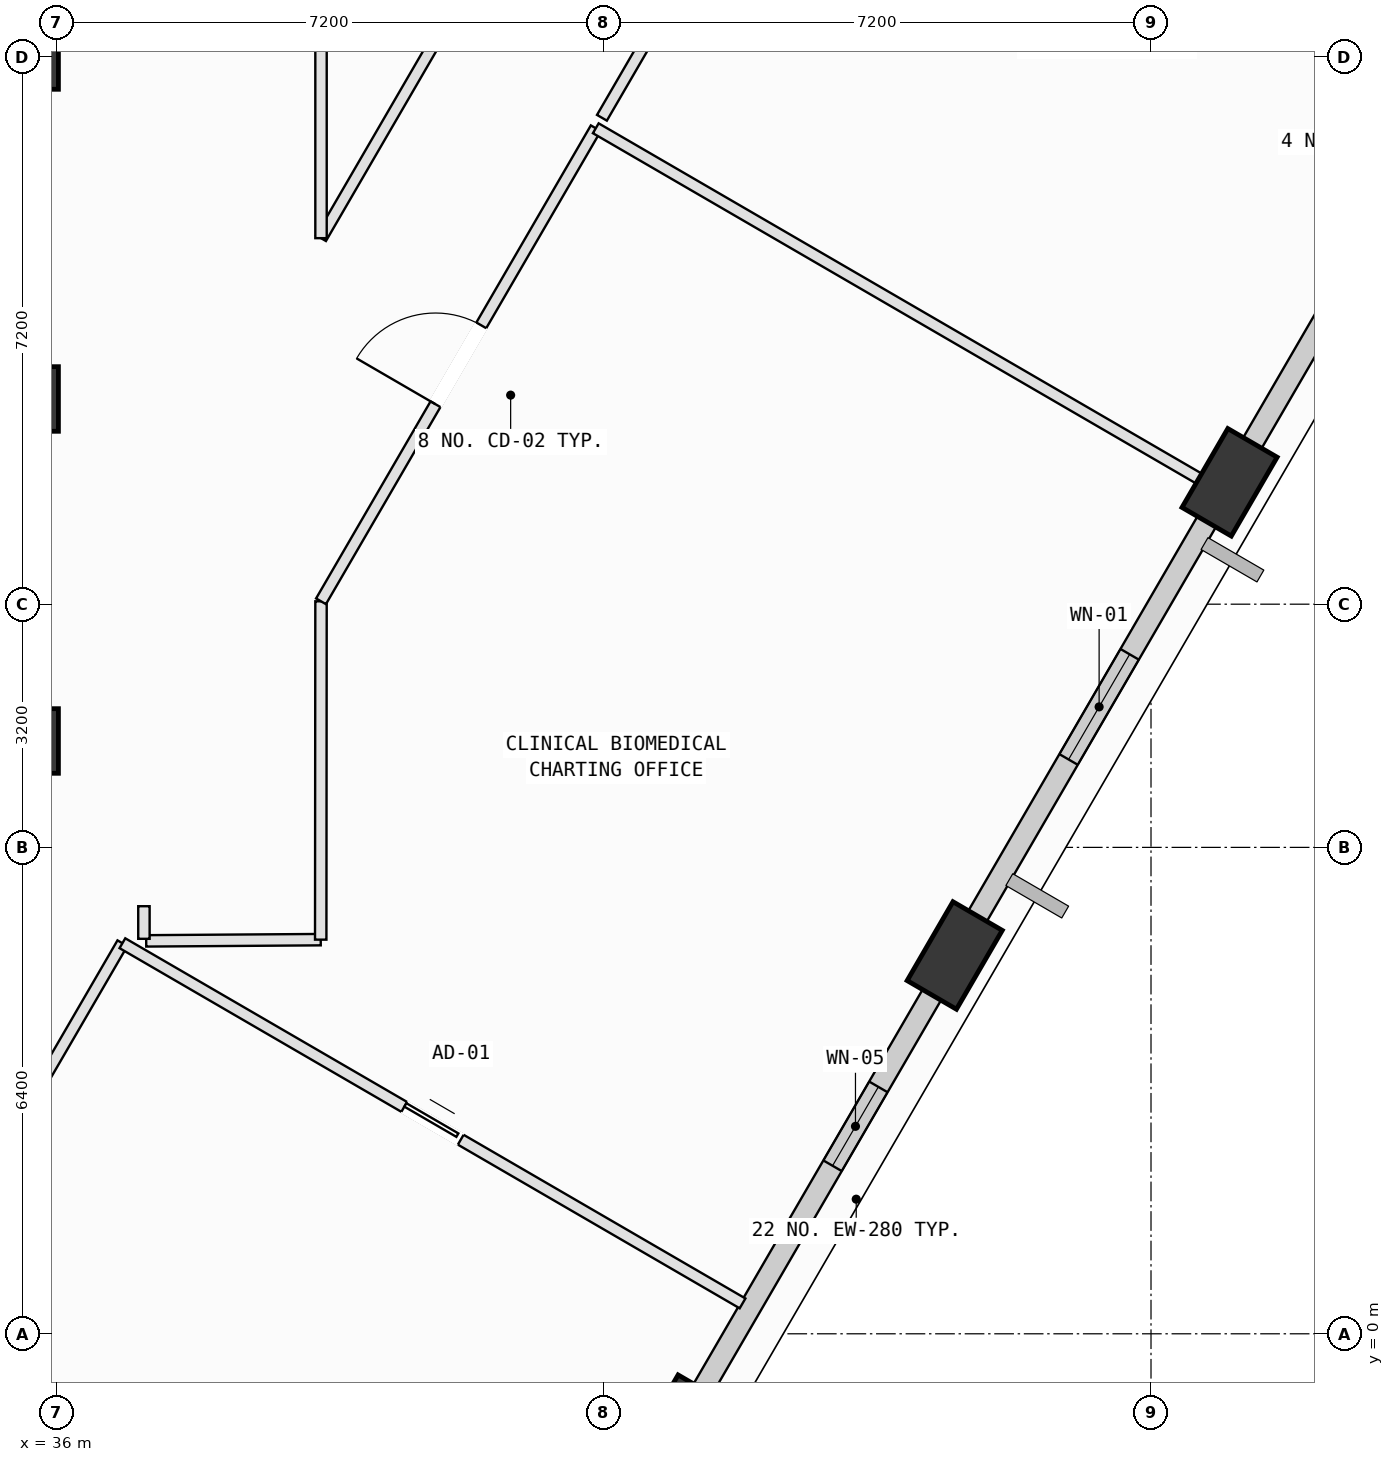
"""IFC4 building model, lengths in metres.
Left out: names, types, materials, properties, quantities, classifications, styles, units other than length and angle.
Written with IfcOpenShell. Run it as: python <this file> out.ifc"""

import sys

from ifc_helpers import new_model, si_unit, direction, frame, frame_2d, origin, origin_2d, place, context, subcontext, project, spatial, rectangle, extrude, element, fill, save


model = new_model("IFC4")
c1 = context("Model", 3, precision=1e-05, world=origin(), true_north=direction((0.0, 1.0)))
c2 = subcontext(c1, "Body", "Model", "MODEL_VIEW")
j1 = project(units=[si_unit("LENGTHUNIT", "METRE"), si_unit("PLANEANGLEUNIT", "RADIAN")], contexts=[c1])
p1 = place(None, origin())
s1 = spatial("IfcSite", under=j1, at=p1, CompositionType="ELEMENT")
p2 = place(p1, origin())
s2 = spatial("IfcBuilding", under=s1, at=p2, CompositionType="ELEMENT")
p3 = place(p2, frame((0.0, 0.0, 280.6)))
s3 = spatial("IfcBuildingStorey", under=s2, at=p3, CompositionType="ELEMENT", Elevation=280.6)
for number, where, z_axis, x_axis in (
    (1, (35.6, 7.8, 0.0), (0.0, 0.0, 1.0), (1.0, 0.0, 0.0)),
    (2, (35.6, 12.3, 0.0), (0.0, 0.0, 1.0), (1.0, 0.0, 0.0)),
    (3, (35.6, 16.8, 0.0), (0.0, 0.0, 1.0), (1.0, 0.0, 0.0)),
):
    element("IfcColumn", number, at=place(p3, frame(where, z_axis=z_axis, x_axis=x_axis)), inside=s3, PredefinedType="COLUMN", context=c2, shape_type="SweptSolid", body=[
        extrude(rectangle(XDim=0.85, YDim=0.85, at=origin_2d()), origin(), (0.0, 0.0, 1.0), 4.0),
    ])
p4 = place(p3, frame((44.201, -1.248, 0.002), z_axis=(0.106858336303, 0.044478796428, 0.993278879586), x_axis=(-0.985962855321, 0.133640815853, 0.100086863596)))
e4 = element("IfcColumn", 4, at=p4, inside=s3, PredefinedType="COLUMN", context=c2, shape_type="SweptSolid", body=[
    extrude(rectangle(XDim=1.2, YDim=0.75, at=origin_2d()), origin(), (0.0, 0.0, 1.0), 4.023),
])
p5 = place(p3, frame((47.817, 4.978, 0.002), z_axis=(0.081264313142, 0.059322340783, 0.994925610935), x_axis=(-0.991015784783, -0.101579667233, 0.087001640875)))
e5 = element("IfcColumn", 5, at=p5, inside=s3, PredefinedType="COLUMN", context=c2, shape_type="SweptSolid", body=[
    extrude(rectangle(XDim=1.2, YDim=0.75, at=origin_2d()), origin(), (0.0, 0.0, 1.0), 4.017),
])
p6 = place(p3, frame((51.434, 11.204, 0.002), z_axis=(0.055536798453, 0.074028788299, 0.995708492743), x_axis=(-0.918464860878, -0.387321957241, 0.080025000913)))
e6 = element("IfcColumn", 6, at=p6, inside=s3, PredefinedType="COLUMN", context=c2, shape_type="SweptSolid", body=[
    extrude(rectangle(XDim=1.2, YDim=0.75, at=origin_2d()), origin(), (0.0, 0.0, 1.0), 4.014),
])
p7 = place(p3, frame((47.715, 4.801, 0.0), z_axis=(0.0, 0.0, 1.0), x_axis=(-0.502288269864, -0.864700233582, 0.0)))
e7 = element("IfcWall", 7, at=p7, inside=s3, PredefinedType="SOLIDWALL", context=c2, shape_type="SweptSolid", body=[
    extrude(rectangle(XDim=6.439, YDim=0.28, at=frame_2d((3.219, 0.0))), origin(), (0.0, 0.0, 1.0), 3.265),
])
p8 = place(p7, frame((1.795, 0.0, 0.75)))
e8 = element("IfcOpeningElement", 8, at=p8, cuts=e7, PredefinedType="OPENING", context=c2, shape_type="SweptSolid", body=[
    extrude(rectangle(XDim=1.2, YDim=1.75, at=frame_2d((0.6, 0.875))), frame((0.0, 0.15, 0.0), z_axis=(0.0, -1.0, 0.0), x_axis=(1.0, 0.0, 0.0)), (0.0, 0.0, 1.0), 0.3),
])
p9 = place(p3, frame((51.327, 11.02, 0.0), z_axis=(0.0, 0.0, 1.0), x_axis=(-0.502267756703, -0.86471214897, 0.0)))
e9 = element("IfcWall", 9, at=p9, inside=s3, PredefinedType="SOLIDWALL", context=c2, shape_type="SweptSolid", body=[
    extrude(rectangle(XDim=6.413, YDim=0.28, at=frame_2d((3.207, 0.0))), origin(), (0.0, 0.0, 1.0), 3.265),
])
p10 = place(p9, frame((2.405, 0.0, 0.75)))
e10 = element("IfcOpeningElement", 10, at=p10, cuts=e9, PredefinedType="OPENING", context=c2, shape_type="SweptSolid", body=[
    extrude(rectangle(XDim=1.6, YDim=1.95, at=frame_2d((0.8, 0.975))), frame((0.0, 0.15, 0.0), z_axis=(0.0, -1.0, 0.0), x_axis=(1.0, 0.0, 0.0)), (0.0, 0.0, 1.0), 0.3),
])
p11 = place(p3, frame((54.944, 17.246, 0.0), z_axis=(0.0, 0.0, 1.0), x_axis=(-0.50227800112, -0.864706198423, 0.0)))
e11 = element("IfcWall", 11, at=p11, inside=s3, PredefinedType="SOLIDWALL", context=c2, shape_type="SweptSolid", body=[
    extrude(rectangle(XDim=6.407, YDim=0.28, at=frame_2d((3.203, 0.0))), origin(), (0.0, 0.0, 1.0), 3.265),
])
p12 = place(p11, frame((2.204, 0.0, 0.75)))
e12 = element("IfcOpeningElement", 12, at=p12, cuts=e11, PredefinedType="OPENING", context=c2, shape_type="SweptSolid", body=[
    extrude(rectangle(XDim=2.0, YDim=1.95, at=frame_2d((1.0, 0.975))), frame((0.0, 0.15, 0.0), z_axis=(0.0, -1.0, 0.0), x_axis=(1.0, 0.0, 0.0)), (0.0, 0.0, 1.0), 0.3),
])
p13 = place(p3, frame((30.852, -5.216, 0.0), z_axis=(0.0, 0.0, 1.0), x_axis=(0.502280600882, 0.864704688306, 0.0)))
e13 = element("IfcWall", 13, at=p13, inside=s3, PredefinedType="PARTITIONING", context=c2, shape_type="SweptSolid", body=[
    extrude(rectangle(XDim=11.975, YDim=0.15, at=frame_2d((5.988, 0.0))), origin(), (0.0, 0.0, 1.0), 3.78),
])
p14 = place(p3, frame((36.867, 5.139, 0.0), z_axis=(0.0, 0.0, 1.0), x_axis=(0.864716809852, -0.502259732369, 0.0)))
e14 = element("IfcWall", 14, at=p14, inside=s3, PredefinedType="PARTITIONING", context=c2, shape_type="SweptSolid", body=[
    extrude(rectangle(XDim=9.435, YDim=0.15, at=frame_2d((4.718, 0.0))), origin(), (0.0, 0.0, 1.0), 3.78),
])
p15 = place(p14, frame((4.288, 0.0, 0.0)))
e15 = element("IfcOpeningElement", 15, at=p15, cuts=e14, PredefinedType="OPENING", context=c2, shape_type="SweptSolid", body=[
    extrude(rectangle(XDim=0.86, YDim=2.06, at=frame_2d((0.43, 1.03))), frame((0.0, 0.085, 0.0), z_axis=(0.0, -1.0, 0.0), x_axis=(1.0, 0.0, 0.0)), (0.0, 0.0, 1.0), 0.17),
])
p16 = place(p3, frame((37.18, 5.17, 0.0), z_axis=(0.0, 0.0, 1.0), x_axis=(0.999975377948, 0.007017371073, 0.0)))
e16 = element("IfcWall", 16, at=p16, inside=s3, PredefinedType="PARTITIONING", context=c2, shape_type="SweptSolid", body=[
    extrude(rectangle(XDim=2.296, YDim=0.15, at=frame_2d((1.148, 0.0))), origin(), (0.0, 0.0, 1.0), 3.78),
])
p17 = place(p3, frame((39.476, 5.186, 0.0), z_axis=(0.0, 0.0, 1.0), x_axis=(0.000877433169, 0.999999615055, 0.0)))
e17 = element("IfcWall", 17, at=p17, inside=s3, PredefinedType="PARTITIONING", context=c2, shape_type="SweptSolid", body=[
    extrude(rectangle(XDim=4.452, YDim=0.15, at=frame_2d((2.226, 0.0))), origin(), (0.0, 0.0, 1.0), 3.78),
])
p18 = place(p3, frame((39.48, 9.638, 0.0), z_axis=(0.0, 0.0, 1.0), x_axis=(0.502237798626, 0.864729549415, 0.0)))
e18 = element("IfcWall", 18, at=p18, inside=s3, PredefinedType="PARTITIONING", context=c2, shape_type="SweptSolid", body=[
    extrude(rectangle(XDim=7.198, YDim=0.15, at=frame_2d((3.599, 0.0))), origin(), (0.0, 0.0, 1.0), 3.78),
])
p19 = place(p18, frame((2.999, 0.0, 0.0)))
e19 = element("IfcOpeningElement", 19, at=p19, cuts=e18, PredefinedType="OPENING", context=c2, shape_type="SweptSolid", body=[
    extrude(rectangle(XDim=1.2, YDim=2.15, at=frame_2d((0.6, 1.075))), frame((0.0, 0.085, 0.0), z_axis=(0.0, -1.0, 0.0), x_axis=(1.0, 0.0, 0.0)), (0.0, 0.0, 1.0), 0.17),
])
p20 = place(p3, frame((43.095, 15.862, 0.0), z_axis=(0.0, 0.0, 1.0), x_axis=(0.864729577588, -0.502237750119, 0.0)))
e20 = element("IfcWall", 20, at=p20, inside=s3, PredefinedType="PARTITIONING", context=c2, shape_type="SweptSolid", body=[
    extrude(rectangle(XDim=9.448, YDim=0.15, at=frame_2d((4.724, 0.0))), origin(), (0.0, 0.0, 1.0), 3.78),
])
p21 = place(p3, frame((48.304, 5.359, 0.0), z_axis=(0.0, 0.0, 1.0), x_axis=(-0.501370369817, -0.86523277346, 0.0)))
e21 = element("IfcWall", 21, at=p21, inside=s3, PredefinedType="PARTITIONING", context=c2, shape_type="SweptSolid", body=[
    extrude(rectangle(XDim=0.778, YDim=0.15, at=frame_2d((0.389, 0.0))), origin(), (0.0, 0.0, 1.0), 3.265),
])
p22 = place(p3, frame((37.15, 5.626, 0.0), z_axis=(0.0, 0.0, 1.0), x_axis=(0.0, -1.0, 0.0)))
e22 = element("IfcWall", 22, at=p22, inside=s3, PredefinedType="PARTITIONING", context=c2, shape_type="SweptSolid", body=[
    extrude(rectangle(XDim=0.429, YDim=0.15, at=frame_2d((0.214, 0.0))), origin(), (0.0, 0.0, 1.0), 3.78),
])
p23 = place(p3, frame((43.176, 16.0, 0.0), z_axis=(0.0, 0.0, 1.0), x_axis=(0.502223094905, 0.864738089218, 0.0)))
e23 = element("IfcWall", 23, at=p23, inside=s3, PredefinedType="PARTITIONING", context=c2, shape_type="SweptSolid", body=[
    extrude(rectangle(XDim=12.24, YDim=0.15, at=frame_2d((6.12, 0.0))), origin(), (0.0, 0.0, 1.0), 3.415),
])
p24 = place(p23, frame((5.52, 0.0, 0.0)))
e24 = element("IfcOpeningElement", 24, at=p24, cuts=e23, PredefinedType="OPENING", context=c2, shape_type="SweptSolid", body=[
    extrude(rectangle(XDim=1.2, YDim=2.15, at=frame_2d((0.6, 1.075))), frame((0.0, 0.085, 0.0), z_axis=(0.0, -1.0, 0.0), x_axis=(1.0, 0.0, 0.0)), (0.0, 0.0, 1.0), 0.17),
])
p25 = place(p3, frame((51.924, 11.591, 0.0), z_axis=(0.0, 0.0, 1.0), x_axis=(-0.501912770939, -0.864918244904, 0.0)))
e25 = element("IfcWall", 25, at=p25, inside=s3, PredefinedType="PARTITIONING", context=c2, shape_type="SweptSolid", body=[
    extrude(rectangle(XDim=0.582, YDim=0.15, at=frame_2d((0.291, 0.0))), origin(), (0.0, 0.0, 1.0), 3.265),
])
p26 = place(p3, frame((42.681, 19.927, 0.0), z_axis=(0.0, 0.0, 1.0), x_axis=(-0.502252880546, -0.86472078961, 0.0)))
e26 = element("IfcWall", 26, at=p26, inside=s3, PredefinedType="PARTITIONING", context=c2, shape_type="SweptSolid", body=[
    extrude(rectangle(XDim=6.373, YDim=0.15, at=frame_2d((3.187, 0.0))), origin(), (0.0, 0.0, 1.0), 3.78),
])
p27 = place(p3, frame((39.48, 14.416, 0.0), z_axis=(0.0, 0.0, 1.0), x_axis=(0.0, 1.0, 0.0)))
e27 = element("IfcWall", 27, at=p27, inside=s3, PredefinedType="PARTITIONING", context=c2, shape_type="SweptSolid", body=[
    extrude(rectangle(XDim=6.437, YDim=0.15, at=frame_2d((3.219, 0.0))), origin(), (0.0, 0.0, 1.0), 3.78),
])
p28 = place(p27, frame((2.618, 0.0, 0.0)))
e28 = element("IfcOpeningElement", 28, at=p28, cuts=e27, PredefinedType="OPENING", context=c2, shape_type="SweptSolid", body=[
    extrude(rectangle(XDim=1.2, YDim=2.15, at=frame_2d((0.6, 1.075))), frame((0.0, 0.085, 0.0), z_axis=(0.0, -1.0, 0.0), x_axis=(1.0, 0.0, 0.0)), (0.0, 0.0, 1.0), 0.17),
])
p29 = place(p8, origin())
e29 = element("IfcWindow", 29, at=p29, inside=s3, PartitioningType="SINGLE_PANEL", PredefinedType="WINDOW", context=c2, shape_type="SweptSolid", body=[
    extrude(rectangle(XDim=1.2, YDim=1.75, at=frame_2d((0.6, 0.875))), frame((0.0, 0.03, 0.0), z_axis=(0.0, -1.0, 0.0), x_axis=(1.0, 0.0, 0.0)), (0.0, 0.0, 1.0), 0.06),
])
fill(e8, e29)
p30 = place(p10, origin())
e30 = element("IfcWindow", 30, at=p30, inside=s3, PartitioningType="SINGLE_PANEL", PredefinedType="WINDOW", context=c2, shape_type="SweptSolid", body=[
    extrude(rectangle(XDim=1.6, YDim=1.95, at=frame_2d((0.8, 0.975))), frame((0.0, 0.03, 0.0), z_axis=(0.0, -1.0, 0.0), x_axis=(1.0, 0.0, 0.0)), (0.0, 0.0, 1.0), 0.06),
])
fill(e10, e30)
p31 = place(p19, origin())
e31 = element("IfcDoor", 31, at=p31, inside=s3, OperationType="SINGLE_SWING_LEFT", PredefinedType="DOOR", context=c2, shape_type="SweptSolid", body=[
    extrude(rectangle(XDim=1.2, YDim=2.15, at=frame_2d((0.6, 1.075))), frame((0.0, 0.025, 0.0), z_axis=(0.0, -1.0, 0.0), x_axis=(1.0, 0.0, 0.0)), (0.0, 0.0, 1.0), 0.05),
])
fill(e19, e31)
p32 = place(p15, origin())
e32 = element("IfcDoor", 32, at=p32, inside=s3, OperationType="SLIDING_TO_LEFT", PredefinedType="DOOR", context=c2, shape_type="SweptSolid", body=[
    extrude(rectangle(XDim=0.86, YDim=2.06, at=frame_2d((0.43, 1.03))), frame((0.0, 0.025, 0.0), z_axis=(0.0, -1.0, 0.0), x_axis=(1.0, 0.0, 0.0)), (0.0, 0.0, 1.0), 0.05),
])
fill(e15, e32)
save(model, sys.argv[1])
